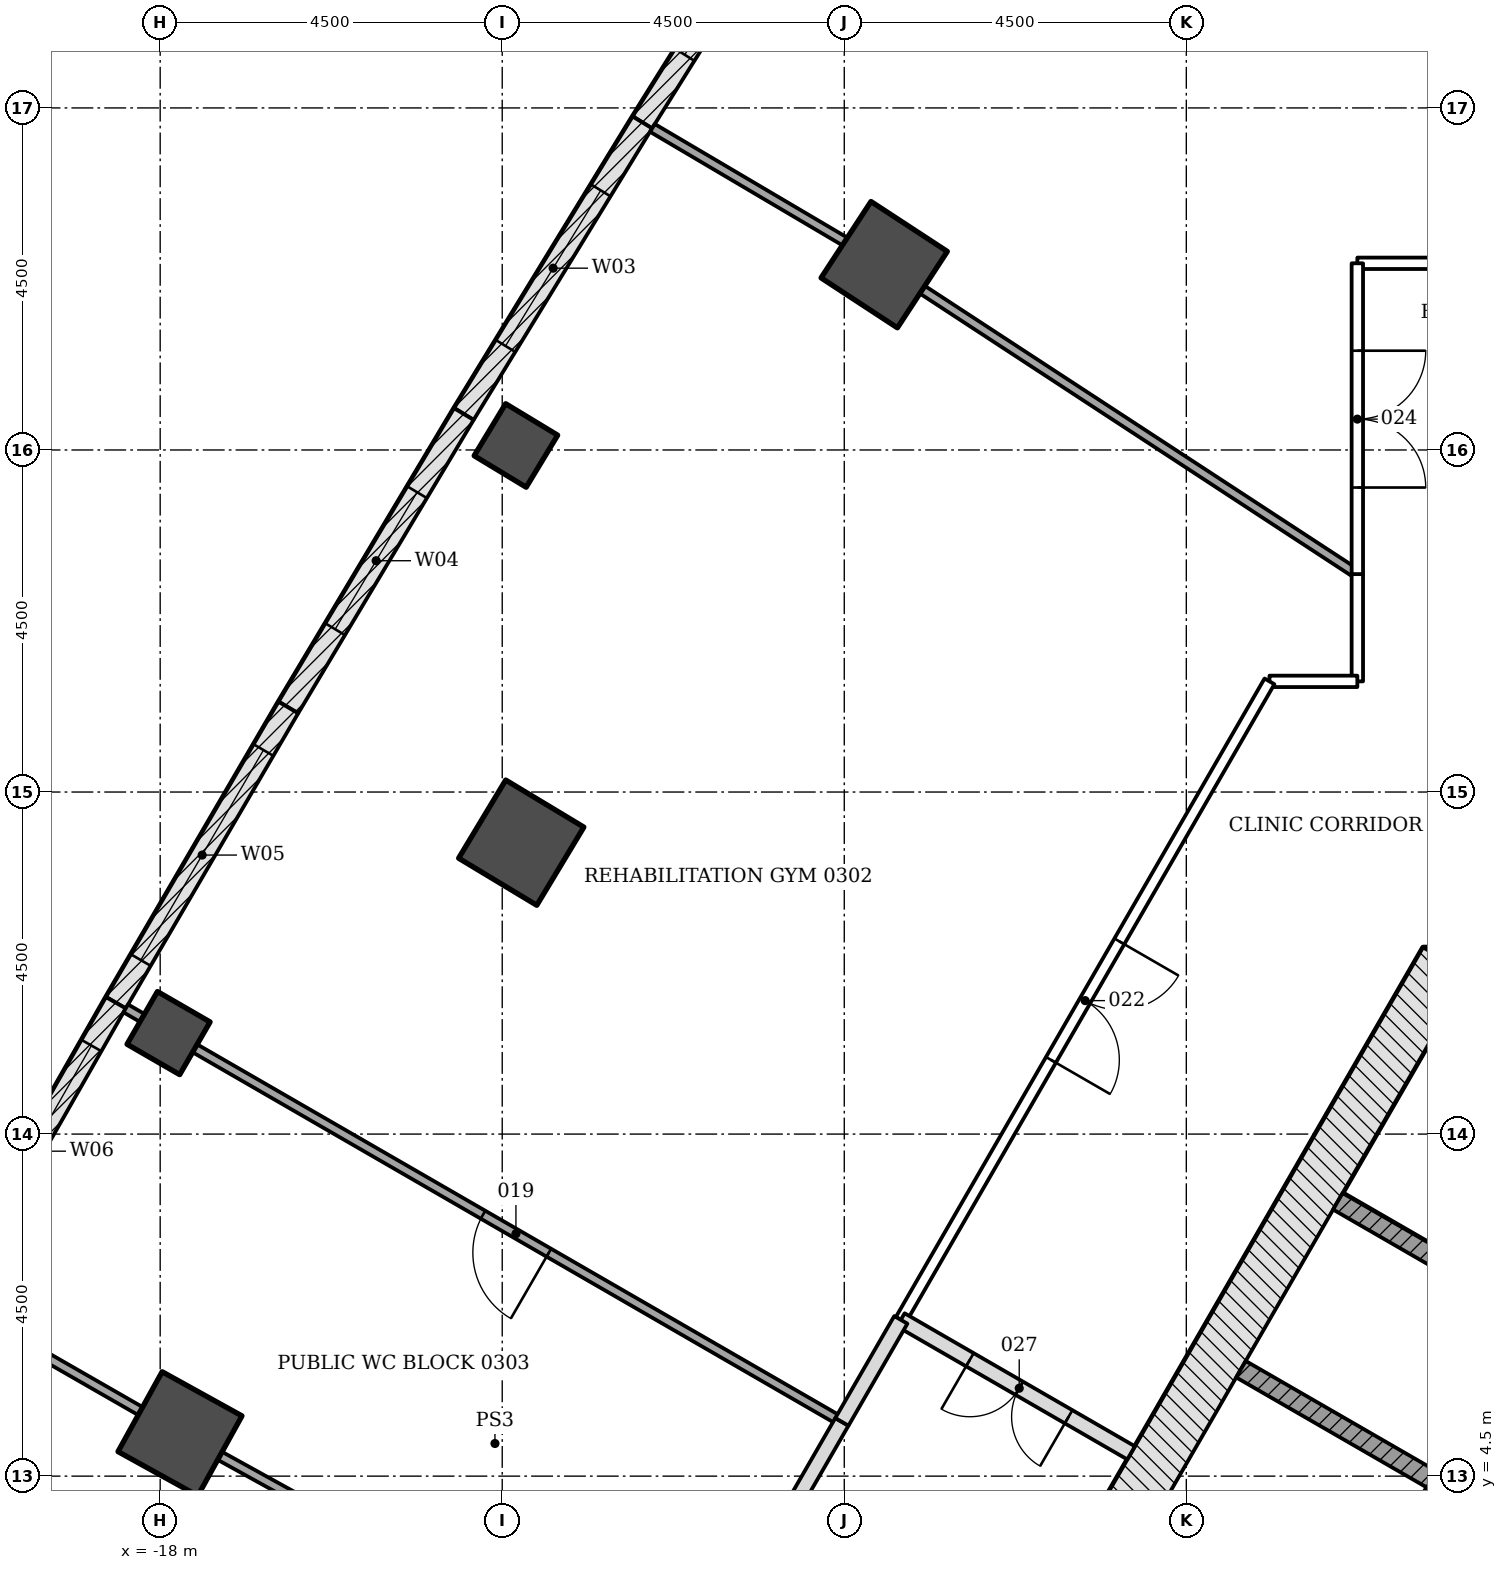
"""IFC4 building model, lengths in metres.
Left out: names, types, materials, properties, quantities, classifications, styles, units other than length and angle.
Written with IfcOpenShell. Run it as: python <this file> out.ifc"""

import sys

from ifc_helpers import new_model, si_unit, direction, frame, frame_2d, origin, origin_2d, place, context, subcontext, project, spatial, rectangle, extrude, element, fill, save


model = new_model("IFC4")
c1 = context("Model", 3, precision=1e-05, world=origin(), true_north=direction((0.0, 1.0)))
c2 = subcontext(c1, "Body", "Model", "MODEL_VIEW")
j1 = project(units=[si_unit("LENGTHUNIT", "METRE"), si_unit("PLANEANGLEUNIT", "RADIAN")], contexts=[c1])
p1 = place(None, origin())
s1 = spatial("IfcSite", under=j1, at=p1, CompositionType="ELEMENT")
p2 = place(p1, origin())
s2 = spatial("IfcBuilding", under=s1, at=p2, CompositionType="ELEMENT")
p3 = place(p2, frame((0.0, 0.0, 15.0)))
s3 = spatial("IfcBuildingStorey", under=s2, at=p3, CompositionType="ELEMENT", Elevation=15.0)
for number, where, z_axis, x_axis in (
    (1, (-8.475, 20.438, -0.25), (0.0, 0.0, 1.0), (-0.837, 0.547, 0.0)),
    (2, (-13.25, 12.834, -0.25), (0.0, 0.0, 1.0), (-0.857, 0.516, 0.0)),
    (3, (-17.739, 5.058, -0.25), (0.0, 0.0, 1.0), (-0.875, 0.484, 0.0)),
):
    element("IfcColumn", number, at=place(p3, frame(where, z_axis=z_axis, x_axis=x_axis)), inside=s3, PredefinedType="COLUMN", context=c2, shape_type="SweptSolid", body=[
        extrude(rectangle(XDim=1.2, YDim=1.2, at=origin_2d()), origin(), (0.0, 0.0, 1.0), 4.5),
    ])
for number, where, z_axis, x_axis in (
    (4, (-13.32, 18.059, -0.25), (0.0, 0.0, 1.0), (-0.856, 0.518, 0.0)),
    (5, (-17.89, 10.329, -0.25), (0.0, 0.0, 1.0), (-0.866, 0.5, 0.0)),
):
    element("IfcColumn", number, at=place(p3, frame(where, z_axis=z_axis, x_axis=x_axis)), inside=s3, PredefinedType="COLUMN", context=c2, shape_type="SweptSolid", body=[
        extrude(rectangle(XDim=0.8, YDim=0.8, at=origin_2d()), origin(), (0.0, 0.0, 1.0), 4.5),
    ])
p4 = place(p3, frame((1.386, 11.106, -0.25), z_axis=(0.0, 0.0, 1.0), x_axis=(-1.0, 0.0, 0.0)))
e6 = element("IfcWall", 6, at=p4, inside=s3, PredefinedType="SHEAR", context=c2, shape_type="SweptSolid", body=[
    extrude(rectangle(XDim=2.771, YDim=0.7, at=frame_2d((1.386, 0.0))), origin(), (0.0, 0.0, 1.0), 4.5),
])
p5 = place(p3, frame((-1.083, 11.281, -0.25), z_axis=(0.0, 0.0, 1.0), x_axis=(-0.500001446645, -0.866024568562, 0.0)))
e7 = element("IfcWall", 7, at=p5, inside=s3, PredefinedType="SHEAR", context=c2, shape_type="SweptSolid", body=[
    extrude(rectangle(XDim=18.458, YDim=0.7, at=frame_2d((9.229, 0.0))), origin(), (0.0, 0.0, 1.0), 4.5),
])
p6 = place(p5, frame((8.979, 0.0, 0.25)))
e8 = element("IfcOpeningElement", 8, at=p6, cuts=e7, PredefinedType="OPENING", context=c2, shape_type="SweptSolid", body=[
    extrude(rectangle(XDim=1.2, YDim=2.1, at=frame_2d((0.6, 1.05))), frame((0.0, 0.36, 0.0), z_axis=(0.0, -1.0, 0.0), x_axis=(1.0, 0.0, 0.0)), (0.0, 0.0, 1.0), 0.72),
])
p7 = place(p5, frame((11.029, 0.0, 0.25)))
e9 = element("IfcOpeningElement", 9, at=p7, cuts=e7, PredefinedType="OPENING", context=c2, shape_type="SweptSolid", body=[
    extrude(rectangle(XDim=1.2, YDim=2.1, at=frame_2d((0.6, 1.05))), frame((0.0, 0.36, 0.0), z_axis=(0.0, -1.0, 0.0), x_axis=(1.0, 0.0, 0.0)), (0.0, 0.0, 1.0), 0.72),
])
p8 = place(p3, frame((-11.655, 22.311, 0.0), z_axis=(0.0, 0.0, 1.0), x_axis=(0.530804082031, 0.847494558389, 0.0)))
e10 = element("IfcWall", 10, at=p8, inside=s3, PredefinedType="NOTDEFINED", context=c2, shape_type="SweptSolid", body=[
    extrude(rectangle(XDim=4.496, YDim=0.3, at=frame_2d((2.248, 0.0))), origin(), (0.0, 0.0, 1.0), 4.25),
])
p9 = place(p8, frame((1.048, 0.0, 0.9)))
e11 = element("IfcOpeningElement", 11, at=p9, cuts=e10, PredefinedType="OPENING", context=c2, shape_type="SweptSolid", body=[
    extrude(rectangle(XDim=2.4, YDim=2.4, at=frame_2d((1.2, 1.2))), frame((0.0, 0.16, 0.0), z_axis=(0.0, -1.0, 0.0), x_axis=(1.0, 0.0, 0.0)), (0.0, 0.0, 1.0), 0.32),
])
p10 = place(p3, frame((-14.004, 18.475, 0.0), z_axis=(0.0, 0.0, 1.0), x_axis=(0.522078085402, 0.852897691838, 0.0)))
e12 = element("IfcWall", 12, at=p10, inside=s3, PredefinedType="NOTDEFINED", context=c2, shape_type="SweptSolid", body=[
    extrude(rectangle(XDim=4.496, YDim=0.3, at=frame_2d((2.248, 0.0))), origin(), (0.0, 0.0, 1.0), 4.25),
])
p11 = place(p10, frame((1.048, 0.0, 0.9)))
e13 = element("IfcOpeningElement", 13, at=p11, cuts=e12, PredefinedType="OPENING", context=c2, shape_type="SweptSolid", body=[
    extrude(rectangle(XDim=2.4, YDim=2.4, at=frame_2d((1.2, 1.2))), frame((0.0, 0.16, 0.0), z_axis=(0.0, -1.0, 0.0), x_axis=(1.0, 0.0, 0.0)), (0.0, 0.0, 1.0), 0.32),
])
p12 = place(p3, frame((-16.313, 14.614, 0.0), z_axis=(0.0, 0.0, 1.0), x_axis=(0.513257465408, 0.858234684805, 0.0)))
e14 = element("IfcWall", 14, at=p12, inside=s3, PredefinedType="NOTDEFINED", context=c2, shape_type="SweptSolid", body=[
    extrude(rectangle(XDim=4.496, YDim=0.3, at=frame_2d((2.248, 0.0))), origin(), (0.0, 0.0, 1.0), 4.25),
])
p13 = place(p12, frame((1.198, 0.0, 0.8)))
e15 = element("IfcOpeningElement", 15, at=p13, cuts=e14, PredefinedType="OPENING", context=c2, shape_type="SweptSolid", body=[
    extrude(rectangle(XDim=2.1, YDim=3.0, at=frame_2d((1.05, 1.5))), frame((0.0, 0.16, 0.0), z_axis=(0.0, -1.0, 0.0), x_axis=(1.0, 0.0, 0.0)), (0.0, 0.0, 1.0), 0.32),
])
p14 = place(p3, frame((-18.582, 10.73, 0.0), z_axis=(0.0, 0.0, 1.0), x_axis=(0.50445499627, 0.86343798662, 0.0)))
e16 = element("IfcWall", 16, at=p14, inside=s3, PredefinedType="NOTDEFINED", context=c2, shape_type="SweptSolid", body=[
    extrude(rectangle(XDim=4.496, YDim=0.3, at=frame_2d((2.248, 0.0))), origin(), (0.0, 0.0, 1.0), 4.25),
])
p15 = place(p14, frame((0.648, 0.0, 0.8)))
e17 = element("IfcOpeningElement", 17, at=p15, cuts=e16, PredefinedType="OPENING", context=c2, shape_type="SweptSolid", body=[
    extrude(rectangle(XDim=3.2, YDim=2.7, at=frame_2d((1.6, 1.35))), frame((0.0, 0.16, 0.0), z_axis=(0.0, -1.0, 0.0), x_axis=(1.0, 0.0, 0.0)), (0.0, 0.0, 1.0), 0.32),
])
p16 = place(p3, frame((-20.811, 6.823, 0.0), z_axis=(0.0, 0.0, 1.0), x_axis=(0.495524760411, 0.868593812907, 0.0)))
e18 = element("IfcWall", 18, at=p16, inside=s3, PredefinedType="NOTDEFINED", context=c2, shape_type="SweptSolid", body=[
    extrude(rectangle(XDim=4.496, YDim=0.3, at=frame_2d((2.248, 0.0))), origin(), (0.0, 0.0, 1.0), 4.25),
])
p17 = place(p16, frame((0.648, 0.0, 0.8)))
e19 = element("IfcOpeningElement", 19, at=p17, cuts=e18, PredefinedType="OPENING", context=c2, shape_type="SweptSolid", body=[
    extrude(rectangle(XDim=3.2, YDim=2.7, at=frame_2d((1.6, 1.35))), frame((0.0, 0.16, 0.0), z_axis=(0.0, -1.0, 0.0), x_axis=(1.0, 0.0, 0.0)), (0.0, 0.0, 1.0), 0.32),
])
p18 = place(p3, frame((-2.506, 8.115, -0.25), z_axis=(0.0, 0.0, 1.0), x_axis=(0.865996321171, -0.50005036918, 0.0)))
e20 = element("IfcWall", 20, at=p18, inside=s3, PredefinedType="PARTITIONING", context=c2, shape_type="SweptSolid", body=[
    extrude(rectangle(XDim=2.9, YDim=0.25, at=frame_2d((1.45, 0.0))), origin(), (0.0, 0.0, 1.0), 4.5),
])
p19 = place(p3, frame((-3.781, 5.907, -0.25), z_axis=(0.0, 0.0, 1.0), x_axis=(0.866032775405, -0.499987231761, 0.0)))
e21 = element("IfcWall", 21, at=p19, inside=s3, PredefinedType="PARTITIONING", context=c2, shape_type="SweptSolid", body=[
    extrude(rectangle(XDim=2.9, YDim=0.25, at=frame_2d((1.45, 0.0))), origin(), (0.0, 0.0, 1.0), 4.5),
])
p20 = place(p3, frame((0.176, 6.711, 0.0), z_axis=(0.0, 0.0, 1.0), x_axis=(-0.500004227369, -0.866022963098, 0.0)))
e22 = element("IfcWall", 22, at=p20, inside=s3, PredefinedType="PARTITIONING", context=c2, shape_type="SweptSolid", body=[
    extrude(rectangle(XDim=11.8, YDim=0.25, at=frame_2d((5.9, 0.0))), origin(), (0.0, 0.0, 1.0), 4.25),
])
p21 = place(p3, frame((-18.26, 5.356, 0.0), z_axis=(0.0, 0.0, 1.0), x_axis=(-0.867283853893, 0.49781393791, 0.0)))
e23 = element("IfcWall", 23, at=p21, inside=s3, PredefinedType="PARTITIONING", context=c2, shape_type="SweptSolid", body=[
    extrude(rectangle(XDim=2.792, YDim=0.12, at=frame_2d((1.396, 0.0))), origin(), (0.0, 0.0, 1.0), 3.633),
])
p22 = place(p3, frame((-11.208, 1.446, 0.0), z_axis=(0.0, 0.0, 1.0), x_axis=(-0.875125393946, 0.483896212912, 0.0)))
e24 = element("IfcWall", 24, at=p22, inside=s3, PredefinedType="PARTITIONING", context=c2, shape_type="SweptSolid", body=[
    extrude(rectangle(XDim=6.863, YDim=0.12, at=frame_2d((3.432, 0.0))), origin(), (0.0, 0.0, 1.0), 3.638),
])
p23 = place(p3, frame((-9.032, 5.213, 0.0), z_axis=(0.0, 0.0, 1.0), x_axis=(-0.499876332206, -0.866096791646, 0.0)))
e25 = element("IfcWall", 25, at=p23, inside=s3, PredefinedType="PARTITIONING", context=c2, shape_type="SweptSolid", body=[
    extrude(rectangle(XDim=4.349, YDim=0.2, at=frame_2d((2.175, 0.0))), origin(), (0.0, 0.0, 1.0), 3.638),
])
p24 = place(p3, frame((-5.226, 4.806, 0.0), z_axis=(0.0, 0.0, 1.0), x_axis=(-0.865949687125, 0.500131122175, 0.0)))
e26 = element("IfcWall", 26, at=p24, inside=s3, PredefinedType="PARTITIONING", context=c2, shape_type="SweptSolid", body=[
    extrude(rectangle(XDim=3.499, YDim=0.2, at=frame_2d((1.75, 0.0))), origin(), (0.0, 0.0, 1.0), 4.25),
])
p25 = place(p24, frame((0.95, 0.0, 0.0)))
e27 = element("IfcOpeningElement", 27, at=p25, cuts=e26, PredefinedType="OPENING", context=c2, shape_type="SweptSolid", body=[
    extrude(rectangle(XDim=1.5, YDim=2.1, at=frame_2d((0.75, 1.05))), frame((0.0, 0.11, 0.0), z_axis=(0.0, -1.0, 0.0), x_axis=(1.0, 0.0, 0.0)), (0.0, 0.0, 1.0), 0.22),
])
p26 = place(p3, frame((-8.256, 6.556, 0.0), z_axis=(0.0, 0.0, 1.0), x_axis=(-0.500104332946, -0.86596515875, 0.0)))
e28 = element("IfcWall", 28, at=p26, inside=s3, PredefinedType="PARTITIONING", context=c2, shape_type="SweptSolid", body=[
    extrude(rectangle(XDim=1.55, YDim=0.2, at=frame_2d((0.775, 0.0))), origin(), (0.0, 0.0, 1.0), 3.638),
])
p27 = place(p3, frame((-18.236, 10.528, 0.0), z_axis=(0.0, 0.0, 1.0), x_axis=(-0.864625231999, 0.50241736454, 0.0)))
e29 = element("IfcWall", 29, at=p27, inside=s3, PredefinedType="PARTITIONING", context=c2, shape_type="SweptSolid", body=[
    extrude(rectangle(XDim=0.251, YDim=0.12, at=frame_2d((0.125, 0.0))), origin(), (0.0, 0.0, 1.0), 4.25),
])
p28 = place(p3, frame((-9.033, 5.214, 0.0), z_axis=(0.0, 0.0, 1.0), x_axis=(-0.866000641544, 0.500042887006, 0.0)))
e30 = element("IfcWall", 30, at=p28, inside=s3, PredefinedType="PARTITIONING", context=c2, shape_type="SweptSolid", body=[
    extrude(rectangle(XDim=9.827, YDim=0.12, at=frame_2d((4.914, 0.0))), origin(), (0.0, 0.0, 1.0), 3.638),
])
p29 = place(p28, frame((4.45, 0.0, 0.0)))
e31 = element("IfcOpeningElement", 31, at=p29, cuts=e30, PredefinedType="OPENING", context=c2, shape_type="SweptSolid", body=[
    extrude(rectangle(XDim=1.0, YDim=2.1, at=frame_2d((0.5, 1.05))), frame((0.0, 0.07, 0.0), z_axis=(0.0, -1.0, 0.0), x_axis=(1.0, 0.0, 0.0)), (0.0, 0.0, 1.0), 0.14),
])
p30 = place(p3, frame((-2.25, 16.367, 0.0), z_axis=(0.0, 0.0, 1.0), x_axis=(0.0, -1.0, 0.0)))
e32 = element("IfcWall", 32, at=p30, inside=s3, PredefinedType="PARTITIONING", context=c2, shape_type="SweptSolid", body=[
    extrude(rectangle(XDim=1.411, YDim=0.15, at=frame_2d((0.706, 0.0))), origin(), (0.0, 0.0, 1.0), 3.638),
])
p31 = place(p3, frame((-2.25, 14.956, 0.0), z_axis=(0.0, 0.0, 1.0), x_axis=(-1.0, 0.0, 0.0)))
e33 = element("IfcWall", 33, at=p31, inside=s3, PredefinedType="PARTITIONING", context=c2, shape_type="SweptSolid", body=[
    extrude(rectangle(XDim=1.156, YDim=0.15, at=frame_2d((0.578, 0.0))), origin(), (0.0, 0.0, 1.0), 4.25),
])
p32 = place(p3, frame((-3.406, 14.956, 0.0), z_axis=(0.0, 0.0, 1.0), x_axis=(-0.500020940175, -0.866013313631, 0.0)))
e34 = element("IfcWall", 34, at=p32, inside=s3, PredefinedType="PARTITIONING", context=c2, shape_type="SweptSolid", body=[
    extrude(rectangle(XDim=9.7, YDim=0.15, at=frame_2d((4.85, 0.0))), origin(), (0.0, 0.0, 1.0), 3.638),
])
p33 = place(p32, frame((3.95, 0.0, 0.0)))
e35 = element("IfcOpeningElement", 35, at=p33, cuts=e34, PredefinedType="OPENING", context=c2, shape_type="SweptSolid", body=[
    extrude(rectangle(XDim=1.8, YDim=2.1, at=frame_2d((0.9, 1.05))), frame((0.0, 0.085, 0.0), z_axis=(0.0, -1.0, 0.0), x_axis=(1.0, 0.0, 0.0)), (0.0, 0.0, 1.0), 0.17),
])
p34 = place(p3, frame((-0.45, 20.456, 0.0), z_axis=(0.0, 0.0, 1.0), x_axis=(-1.0, 0.0, 0.0)))
e36 = element("IfcWall", 36, at=p34, inside=s3, PredefinedType="PARTITIONING", context=c2, shape_type="SweptSolid", body=[
    extrude(rectangle(XDim=1.8, YDim=0.15, at=frame_2d((0.9, 0.0))), origin(), (0.0, 0.0, 1.0), 3.638),
])
p35 = place(p3, frame((-2.25, 20.456, 0.0), z_axis=(0.0, 0.0, 1.0), x_axis=(0.0, -1.0, 0.0)))
e37 = element("IfcWall", 37, at=p35, inside=s3, PredefinedType="PARTITIONING", context=c2, shape_type="SweptSolid", body=[
    extrude(rectangle(XDim=4.089, YDim=0.15, at=frame_2d((2.044, 0.0))), origin(), (0.0, 0.0, 1.0), 3.638),
])
p36 = place(p35, frame((1.15, 0.0, 0.0)))
e38 = element("IfcOpeningElement", 38, at=p36, cuts=e37, PredefinedType="OPENING", context=c2, shape_type="SweptSolid", body=[
    extrude(rectangle(XDim=1.8, YDim=2.1, at=frame_2d((0.9, 1.05))), frame((0.0, 0.085, 0.0), z_axis=(0.0, -1.0, 0.0), x_axis=(1.0, 0.0, 0.0)), (0.0, 0.0, 1.0), 0.17),
])
p37 = place(p3, frame((-8.992, 20.743, 0.0), z_axis=(0.0, 0.0, 1.0), x_axis=(-0.861228913487, 0.508217235613, 0.0)))
e39 = element("IfcWall", 39, at=p37, inside=s3, PredefinedType="PARTITIONING", context=c2, shape_type="SweptSolid", body=[
    extrude(rectangle(XDim=2.94, YDim=0.12, at=frame_2d((1.47, 0.0))), origin(), (0.0, 0.0, 1.0), 3.633),
])
p38 = place(p3, frame((-2.252, 16.367, 0.0), z_axis=(0.0, 0.0, 1.0), x_axis=(-0.83688089218, 0.547385031129, 0.0)))
e40 = element("IfcWall", 40, at=p38, inside=s3, PredefinedType="PARTITIONING", context=c2, shape_type="SweptSolid", body=[
    extrude(rectangle(XDim=6.836, YDim=0.12, at=frame_2d((3.418, 0.0))), origin(), (0.0, 0.0, 1.0), 3.638),
])
p39 = place(p9, origin())
e41 = element("IfcWindow", 41, at=p39, inside=s3, PartitioningType="DOUBLE_PANEL_VERTICAL", PredefinedType="WINDOW", context=c2, shape_type="SweptSolid", body=[
    extrude(rectangle(XDim=2.4, YDim=2.4, at=frame_2d((1.2, 1.2))), frame((0.0, 0.03, 0.0), z_axis=(0.0, -1.0, 0.0), x_axis=(1.0, 0.0, 0.0)), (0.0, 0.0, 1.0), 0.06),
])
fill(e11, e41)
p40 = place(p11, origin())
e42 = element("IfcWindow", 42, at=p40, inside=s3, PartitioningType="DOUBLE_PANEL_VERTICAL", PredefinedType="WINDOW", context=c2, shape_type="SweptSolid", body=[
    extrude(rectangle(XDim=2.4, YDim=2.4, at=frame_2d((1.2, 1.2))), frame((0.0, 0.03, 0.0), z_axis=(0.0, -1.0, 0.0), x_axis=(1.0, 0.0, 0.0)), (0.0, 0.0, 1.0), 0.06),
])
fill(e13, e42)
p41 = place(p13, origin())
e43 = element("IfcWindow", 43, at=p41, inside=s3, PartitioningType="DOUBLE_PANEL_HORIZONTAL", PredefinedType="WINDOW", context=c2, shape_type="SweptSolid", body=[
    extrude(rectangle(XDim=2.1, YDim=3.0, at=frame_2d((1.05, 1.5))), frame((0.0, 0.03, 0.0), z_axis=(0.0, -1.0, 0.0), x_axis=(1.0, 0.0, 0.0)), (0.0, 0.0, 1.0), 0.06),
])
fill(e15, e43)
p42 = place(p15, origin())
e44 = element("IfcWindow", 44, at=p42, inside=s3, PartitioningType="TRIPLE_PANEL_VERTICAL", PredefinedType="WINDOW", context=c2, shape_type="SweptSolid", body=[
    extrude(rectangle(XDim=3.2, YDim=2.7, at=frame_2d((1.6, 1.35))), frame((0.0, 0.03, 0.0), z_axis=(0.0, -1.0, 0.0), x_axis=(1.0, 0.0, 0.0)), (0.0, 0.0, 1.0), 0.06),
])
fill(e17, e44)
p43 = place(p17, origin())
e45 = element("IfcWindow", 45, at=p43, inside=s3, PartitioningType="TRIPLE_PANEL_VERTICAL", PredefinedType="WINDOW", context=c2, shape_type="SweptSolid", body=[
    extrude(rectangle(XDim=3.2, YDim=2.7, at=frame_2d((1.6, 1.35))), frame((0.0, 0.03, 0.0), z_axis=(0.0, -1.0, 0.0), x_axis=(1.0, 0.0, 0.0)), (0.0, 0.0, 1.0), 0.06),
])
fill(e19, e45)
p44 = place(p29, origin())
e46 = element("IfcDoor", 46, at=p44, inside=s3, OperationType="SINGLE_SWING_RIGHT", PredefinedType="DOOR", context=c2, shape_type="SweptSolid", body=[
    extrude(rectangle(XDim=1.0, YDim=2.1, at=frame_2d((0.5, 1.05))), frame((0.0, 0.025, 0.0), z_axis=(0.0, -1.0, 0.0), x_axis=(1.0, 0.0, 0.0)), (0.0, 0.0, 1.0), 0.05),
])
fill(e31, e46)
p45 = place(p33, origin())
e47 = element("IfcDoor", 47, at=p45, inside=s3, OperationType="DOUBLE_DOOR_SINGLE_SWING", PredefinedType="DOOR", context=c2, shape_type="SweptSolid", body=[
    extrude(rectangle(XDim=1.8, YDim=2.1, at=frame_2d((0.9, 1.05))), frame((0.0, 0.025, 0.0), z_axis=(0.0, -1.0, 0.0), x_axis=(1.0, 0.0, 0.0)), (0.0, 0.0, 1.0), 0.05),
])
fill(e35, e47)
p46 = place(p36, origin())
e48 = element("IfcDoor", 48, at=p46, inside=s3, OperationType="DOUBLE_DOOR_SINGLE_SWING", PredefinedType="DOOR", context=c2, shape_type="SweptSolid", body=[
    extrude(rectangle(XDim=1.8, YDim=2.1, at=frame_2d((0.9, 1.05))), frame((0.0, 0.025, 0.0), z_axis=(0.0, -1.0, 0.0), x_axis=(1.0, 0.0, 0.0)), (0.0, 0.0, 1.0), 0.05),
])
fill(e38, e48)
p47 = place(p25, origin())
e49 = element("IfcDoor", 49, at=p47, inside=s3, OperationType="DOUBLE_DOOR_SINGLE_SWING", PredefinedType="DOOR", context=c2, shape_type="SweptSolid", body=[
    extrude(rectangle(XDim=1.5, YDim=2.1, at=frame_2d((0.75, 1.05))), frame((0.0, 0.025, 0.0), z_axis=(0.0, -1.0, 0.0), x_axis=(1.0, 0.0, 0.0)), (0.0, 0.0, 1.0), 0.05),
])
fill(e27, e49)
save(model, sys.argv[1])
